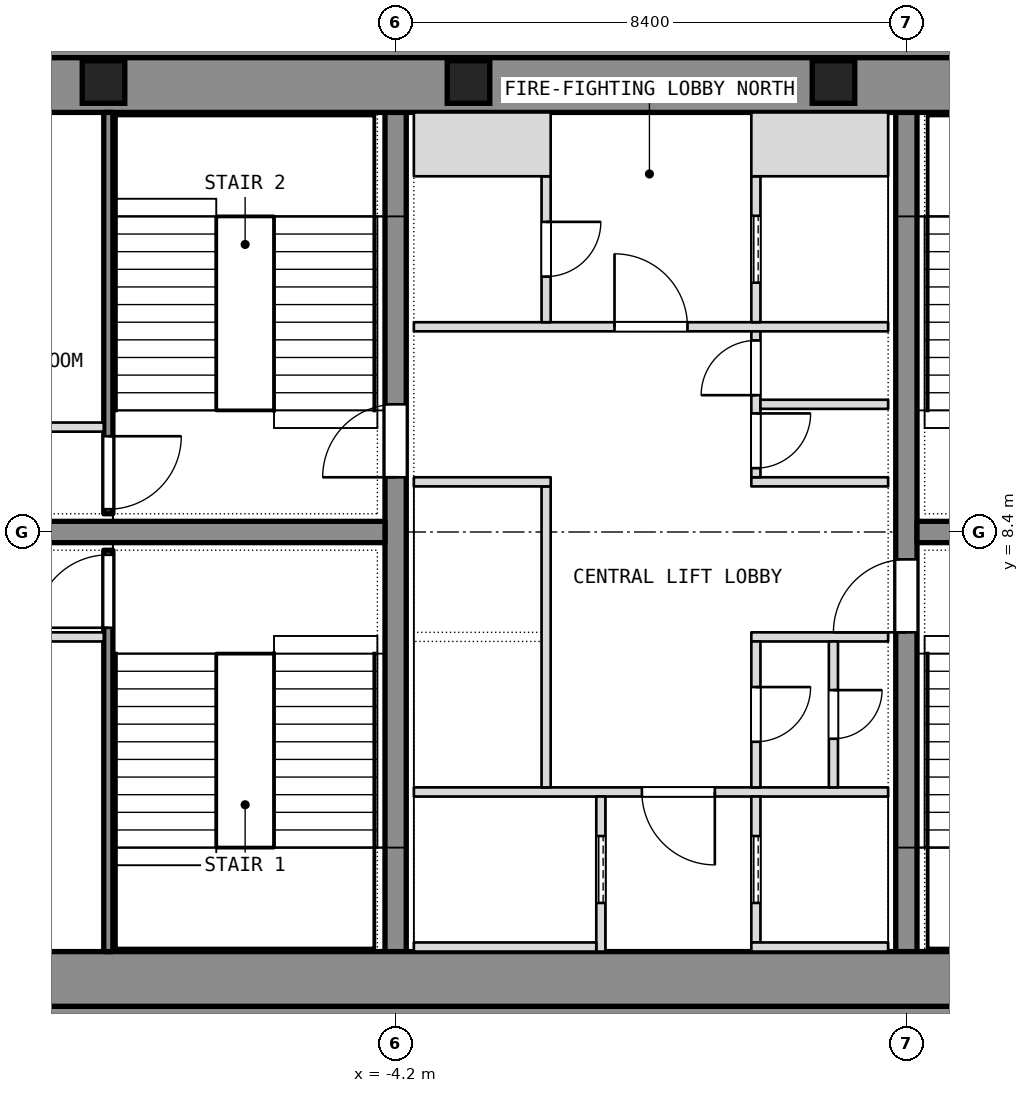
"""IFC4 building model, lengths in metres.
Left out: names, types, materials, properties, quantities, classifications, styles, units other than length and angle.
Written with IfcOpenShell. Run it as: python <this file> out.ifc"""

import sys

from ifc_helpers import new_model, si_unit, direction, frame, frame_2d, origin, origin_2d, place, context, subcontext, project, spatial, rectangle, extrude, element, fill, save


model = new_model("IFC4")
c1 = context("Model", 3, precision=1e-05, world=origin(), true_north=direction((0.0, 1.0)))
c2 = subcontext(c1, "Body", "Model", "MODEL_VIEW")
j1 = project(units=[si_unit("LENGTHUNIT", "METRE"), si_unit("PLANEANGLEUNIT", "RADIAN")], contexts=[c1])
p1 = place(None, origin())
s1 = spatial("IfcSite", under=j1, at=p1, CompositionType="ELEMENT")
p2 = place(p1, origin())
s2 = spatial("IfcBuilding", under=s1, at=p2, CompositionType="ELEMENT")
p3 = place(p2, frame((0.0, 0.0, 266.9)))
s3 = spatial("IfcBuildingStorey", under=s2, at=p3, CompositionType="ELEMENT", Elevation=266.9)
for number, where, z_axis, x_axis in (
    (1, (-11.1, 0.3, 0.0), (0.0, 0.0, 1.0), (1.0, 0.0, 0.0)),
    (2, (-11.1, 16.5, 0.0), (0.0, 0.0, 1.0), (1.0, 0.0, 0.0)),
):
    element("IfcWall", number, at=place(p3, frame(where, z_axis=z_axis, x_axis=x_axis)), inside=s3, PredefinedType="SHEAR", context=c2, shape_type="SweptSolid", body=[
        extrude(rectangle(XDim=22.2, YDim=0.6, at=frame_2d((11.1, 0.0))), origin(), (0.0, 0.0, 1.0), 3.6),
    ])
p4 = place(p3, frame((-4.2, 0.6, 0.0), z_axis=(0.0, 0.0, 1.0), x_axis=(0.0, 1.0, 0.0)))
e3 = element("IfcWall", 3, at=p4, inside=s3, PredefinedType="SHEAR", context=c2, shape_type="SweptSolid", body=[
    extrude(rectangle(XDim=15.6, YDim=0.35, at=frame_2d((7.8, 0.0))), origin(), (0.0, 0.0, 1.0), 3.6),
])
p5 = place(p4, frame((8.7, 0.0, 0.0)))
e4 = element("IfcOpeningElement", 4, at=p5, cuts=e3, PredefinedType="OPENING", context=c2, shape_type="SweptSolid", body=[
    extrude(rectangle(XDim=1.2, YDim=2.1, at=frame_2d((0.6, 1.05))), frame((0.0, 0.175, 0.0), z_axis=(0.0, -1.0, 0.0), x_axis=(1.0, 0.0, 0.0)), (0.0, 0.0, 1.0), 0.35),
])
p6 = place(p3, frame((4.2, 0.6, 0.0), z_axis=(0.0, 0.0, 1.0), x_axis=(0.0, 1.0, 0.0)))
e5 = element("IfcWall", 5, at=p6, inside=s3, PredefinedType="SHEAR", context=c2, shape_type="SweptSolid", body=[
    extrude(rectangle(XDim=15.6, YDim=0.35, at=frame_2d((7.8, 0.0))), origin(), (0.0, 0.0, 1.0), 3.6),
])
p7 = place(p6, frame((6.15, 0.0, 0.0)))
e6 = element("IfcOpeningElement", 6, at=p7, cuts=e5, PredefinedType="OPENING", context=c2, shape_type="SweptSolid", body=[
    extrude(rectangle(XDim=1.2, YDim=2.1, at=frame_2d((0.6, 1.05))), frame((0.0, 0.175, 0.0), z_axis=(0.0, -1.0, 0.0), x_axis=(1.0, 0.0, 0.0)), (0.0, 0.0, 1.0), 0.35),
])
for number, where, z_axis, x_axis in (
    (7, (-11.1, 8.4, 0.0), (0.0, 0.0, 1.0), (1.0, 0.0, 0.0)),
    (8, (4.375, 8.4, 0.0), (0.0, 0.0, 1.0), (1.0, 0.0, 0.0)),
):
    element("IfcWall", number, at=place(p3, frame(where, z_axis=z_axis, x_axis=x_axis)), inside=s3, PredefinedType="SHEAR", context=c2, shape_type="SweptSolid", body=[
        extrude(rectangle(XDim=6.725, YDim=0.35, at=frame_2d((3.363, 0.0))), origin(), (0.0, 0.0, 1.0), 3.6),
    ])
for number, where, z_axis, x_axis in (
    (9, (-9.004, 15.8, 0.0), (0.0, 0.0, 1.0), (1.0, 0.0, 0.0)),
    (10, (-3.001, 15.8, 0.0), (0.0, 0.0, 1.0), (1.0, 0.0, 0.0)),
    (11, (3.001, 15.8, 0.0), (0.0, 0.0, 1.0), (1.0, 0.0, 0.0)),
):
    element("IfcColumn", number, at=place(p3, frame(where, z_axis=z_axis, x_axis=x_axis)), inside=s3, PredefinedType="COLUMN", context=c2, shape_type="SweptSolid", body=[
        extrude(rectangle(XDim=0.7, YDim=0.7, at=origin_2d()), origin(), (0.0, 0.0, 1.0), 3.6),
    ])
for number, where, z_axis, x_axis in (
    (12, (-11.1, 1.05, 0.0), (0.0, 0.0, 1.0), (1.0, 0.0, 0.0)),
    (13, (-11.1, 15.75, 0.0), (0.0, 0.0, 1.0), (1.0, 0.0, 0.0)),
):
    element("IfcWall", number, at=place(p3, frame(where, z_axis=z_axis, x_axis=x_axis)), inside=s3, PredefinedType="PARTITIONING", context=c2, shape_type="SweptSolid", body=[
        extrude(rectangle(XDim=22.2, YDim=0.9, at=frame_2d((11.1, 0.0))), origin(), (0.0, 0.0, 1.0), 3.34),
    ])
p8 = place(p3, frame((-8.925, 1.5, 0.0), z_axis=(0.0, 0.0, 1.0), x_axis=(0.0, 1.0, 0.0)))
e14 = element("IfcWall", 14, at=p8, inside=s3, PredefinedType="SHEAR", context=c2, shape_type="SweptSolid", body=[
    extrude(rectangle(XDim=6.6, YDim=0.15, at=frame_2d((3.3, 0.0))), origin(), (0.0, 0.0, 1.0), 3.34),
])
p9 = place(p8, frame((5.325, 0.0, 0.0)))
e15 = element("IfcOpeningElement", 15, at=p9, cuts=e14, PredefinedType="OPENING", context=c2, shape_type="SweptSolid", body=[
    extrude(rectangle(XDim=1.2, YDim=2.1, at=frame_2d((0.6, 1.05))), frame((0.0, 0.075, 0.0), z_axis=(0.0, -1.0, 0.0), x_axis=(1.0, 0.0, 0.0)), (0.0, 0.0, 1.0), 0.15),
])
p10 = place(p3, frame((-11.1, 6.675, 0.0), z_axis=(0.0, 0.0, 1.0), x_axis=(1.0, 0.0, 0.0)))
e16 = element("IfcWall", 16, at=p10, inside=s3, PredefinedType="PARTITIONING", context=c2, shape_type="SweptSolid", body=[
    extrude(rectangle(XDim=2.1, YDim=0.15, at=frame_2d((1.05, 0.0))), origin(), (0.0, 0.0, 1.0), 3.34),
])
p11 = place(p3, frame((-8.925, 8.7, 0.0), z_axis=(0.0, 0.0, 1.0), x_axis=(0.0, 1.0, 0.0)))
e17 = element("IfcWall", 17, at=p11, inside=s3, PredefinedType="SHEAR", context=c2, shape_type="SweptSolid", body=[
    extrude(rectangle(XDim=6.6, YDim=0.15, at=frame_2d((3.3, 0.0))), origin(), (0.0, 0.0, 1.0), 3.34),
])
p12 = place(p11, frame((0.075, 0.0, 0.0)))
e18 = element("IfcOpeningElement", 18, at=p12, cuts=e17, PredefinedType="OPENING", context=c2, shape_type="SweptSolid", body=[
    extrude(rectangle(XDim=1.2, YDim=2.1, at=frame_2d((0.6, 1.05))), frame((0.0, 0.075, 0.0), z_axis=(0.0, -1.0, 0.0), x_axis=(1.0, 0.0, 0.0)), (0.0, 0.0, 1.0), 0.15),
])
p13 = place(p3, frame((-11.1, 10.125, 0.0), z_axis=(0.0, 0.0, 1.0), x_axis=(1.0, 0.0, 0.0)))
e19 = element("IfcWall", 19, at=p13, inside=s3, PredefinedType="PARTITIONING", context=c2, shape_type="SweptSolid", body=[
    extrude(rectangle(XDim=2.1, YDim=0.15, at=frame_2d((1.05, 0.0))), origin(), (0.0, 0.0, 1.0), 3.34),
])
p14 = place(p3, frame((-3.9, 4.125, 0.0), z_axis=(0.0, 0.0, 1.0), x_axis=(1.0, 0.0, 0.0)))
e20 = element("IfcWall", 20, at=p14, inside=s3, PredefinedType="PARTITIONING", context=c2, shape_type="SweptSolid", body=[
    extrude(rectangle(XDim=7.8, YDim=0.15, at=frame_2d((3.9, 0.0))), origin(), (0.0, 0.0, 1.0), 3.34),
])
p15 = place(p14, frame((3.75, 0.0, 0.0)))
e21 = element("IfcOpeningElement", 21, at=p15, cuts=e20, PredefinedType="OPENING", context=c2, shape_type="SweptSolid", body=[
    extrude(rectangle(XDim=1.2, YDim=2.1, at=frame_2d((0.6, 1.05))), frame((0.0, 0.075, 0.0), z_axis=(0.0, -1.0, 0.0), x_axis=(1.0, 0.0, 0.0)), (0.0, 0.0, 1.0), 0.15),
])
p16 = place(p3, frame((-3.9, 11.775, 0.0), z_axis=(0.0, 0.0, 1.0), x_axis=(1.0, 0.0, 0.0)))
e22 = element("IfcWall", 22, at=p16, inside=s3, PredefinedType="PARTITIONING", context=c2, shape_type="SweptSolid", body=[
    extrude(rectangle(XDim=7.8, YDim=0.15, at=frame_2d((3.9, 0.0))), origin(), (0.0, 0.0, 1.0), 3.34),
])
p17 = place(p16, frame((3.3, 0.0, 0.0)))
e23 = element("IfcOpeningElement", 23, at=p17, cuts=e22, PredefinedType="OPENING", context=c2, shape_type="SweptSolid", body=[
    extrude(rectangle(XDim=1.2, YDim=2.1, at=frame_2d((0.6, 1.05))), frame((0.0, 0.075, 0.0), z_axis=(0.0, -1.0, 0.0), x_axis=(1.0, 0.0, 0.0)), (0.0, 0.0, 1.0), 0.15),
])
p18 = place(p3, frame((-0.825, 1.5, 0.0), z_axis=(0.0, 0.0, 1.0), x_axis=(0.0, 1.0, 0.0)))
e24 = element("IfcWall", 24, at=p18, inside=s3, PredefinedType="SHEAR", context=c2, shape_type="SweptSolid", body=[
    extrude(rectangle(XDim=2.55, YDim=0.15, at=frame_2d((1.275, 0.0))), origin(), (0.0, 0.0, 1.0), 3.6),
])
p19 = place(p18, frame((0.8, 0.0, 0.0)))
e25 = element("IfcOpeningElement", 25, at=p19, cuts=e24, PredefinedType="OPENING", context=c2, shape_type="SweptSolid", body=[
    extrude(rectangle(XDim=1.1, YDim=2.1, at=frame_2d((0.55, 1.05))), frame((0.0, 0.075, 0.0), z_axis=(0.0, -1.0, 0.0), x_axis=(1.0, 0.0, 0.0)), (0.0, 0.0, 1.0), 0.15),
])
p20 = place(p3, frame((-3.9, 1.575, 0.0), z_axis=(0.0, 0.0, 1.0), x_axis=(1.0, 0.0, 0.0)))
e26 = element("IfcWall", 26, at=p20, inside=s3, PredefinedType="SHEAR", context=c2, shape_type="SweptSolid", body=[
    extrude(rectangle(XDim=3.0, YDim=0.15, at=frame_2d((1.5, 0.0))), origin(), (0.0, 0.0, 1.0), 3.6),
])
p21 = place(p3, frame((-1.725, 4.2, 0.0), z_axis=(0.0, 0.0, 1.0), x_axis=(0.0, 1.0, 0.0)))
e27 = element("IfcWall", 27, at=p21, inside=s3, PredefinedType="SHEAR", context=c2, shape_type="SweptSolid", body=[
    extrude(rectangle(XDim=4.95, YDim=0.15, at=frame_2d((2.475, 0.0))), origin(), (0.0, 0.0, 1.0), 3.6),
])
p22 = place(p3, frame((-3.9, 9.225, 0.0), z_axis=(0.0, 0.0, 1.0), x_axis=(1.0, 0.0, 0.0)))
e28 = element("IfcWall", 28, at=p22, inside=s3, PredefinedType="SHEAR", context=c2, shape_type="SweptSolid", body=[
    extrude(rectangle(XDim=2.25, YDim=0.15, at=frame_2d((1.125, 0.0))), origin(), (0.0, 0.0, 1.0), 3.6),
])
p23 = place(p3, frame((-1.725, 11.85, 0.0), z_axis=(0.0, 0.0, 1.0), x_axis=(0.0, 1.0, 0.0)))
e29 = element("IfcWall", 29, at=p23, inside=s3, PredefinedType="PARTITIONING", context=c2, shape_type="SweptSolid", body=[
    extrude(rectangle(XDim=2.4, YDim=0.15, at=frame_2d((1.2, 0.0))), origin(), (0.0, 0.0, 1.0), 3.34),
])
p24 = place(p23, frame((0.75, 0.0, 0.0)))
e30 = element("IfcOpeningElement", 30, at=p24, cuts=e29, PredefinedType="OPENING", context=c2, shape_type="SweptSolid", body=[
    extrude(rectangle(XDim=0.9, YDim=2.1, at=frame_2d((0.45, 1.05))), frame((0.0, 0.075, 0.0), z_axis=(0.0, -1.0, 0.0), x_axis=(1.0, 0.0, 0.0)), (0.0, 0.0, 1.0), 0.15),
])
p25 = place(p3, frame((-3.9, 14.775, 0.0), z_axis=(0.0, 0.0, 1.0), x_axis=(1.0, 0.0, 0.0)))
e31 = element("IfcWall", 31, at=p25, inside=s3, PredefinedType="PARTITIONING", context=c2, shape_type="SweptSolid", body=[
    extrude(rectangle(XDim=2.25, YDim=1.05, at=frame_2d((1.125, 0.0))), origin(), (0.0, 0.0, 1.0), 3.34),
])
p26 = place(p3, frame((1.725, 1.65, 0.0), z_axis=(0.0, 0.0, 1.0), x_axis=(0.0, 1.0, 0.0)))
e32 = element("IfcWall", 32, at=p26, inside=s3, PredefinedType="SHEAR", context=c2, shape_type="SweptSolid", body=[
    extrude(rectangle(XDim=2.4, YDim=0.15, at=frame_2d((1.2, 0.0))), origin(), (0.0, 0.0, 1.0), 3.6),
])
p27 = place(p26, frame((0.65, 0.0, 0.0)))
e33 = element("IfcOpeningElement", 33, at=p27, cuts=e32, PredefinedType="OPENING", context=c2, shape_type="SweptSolid", body=[
    extrude(rectangle(XDim=1.1, YDim=2.1, at=frame_2d((0.55, 1.05))), frame((0.0, 0.075, 0.0), z_axis=(0.0, -1.0, 0.0), x_axis=(1.0, 0.0, 0.0)), (0.0, 0.0, 1.0), 0.15),
])
p28 = place(p3, frame((1.65, 1.575, 0.0), z_axis=(0.0, 0.0, 1.0), x_axis=(1.0, 0.0, 0.0)))
e34 = element("IfcWall", 34, at=p28, inside=s3, PredefinedType="SHEAR", context=c2, shape_type="SweptSolid", body=[
    extrude(rectangle(XDim=2.25, YDim=0.15, at=frame_2d((1.125, 0.0))), origin(), (0.0, 0.0, 1.0), 3.6),
])
p29 = place(p3, frame((1.725, 11.85, 0.0), z_axis=(0.0, 0.0, 1.0), x_axis=(0.0, 1.0, 0.0)))
e35 = element("IfcWall", 35, at=p29, inside=s3, PredefinedType="SHEAR", context=c2, shape_type="SweptSolid", body=[
    extrude(rectangle(XDim=2.4, YDim=0.15, at=frame_2d((1.2, 0.0))), origin(), (0.0, 0.0, 1.0), 3.6),
])
p30 = place(p29, frame((0.65, 0.0, 0.0)))
e36 = element("IfcOpeningElement", 36, at=p30, cuts=e35, PredefinedType="OPENING", context=c2, shape_type="SweptSolid", body=[
    extrude(rectangle(XDim=1.1, YDim=2.1, at=frame_2d((0.55, 1.05))), frame((0.0, 0.075, 0.0), z_axis=(0.0, -1.0, 0.0), x_axis=(1.0, 0.0, 0.0)), (0.0, 0.0, 1.0), 0.15),
])
p31 = place(p3, frame((1.65, 14.775, 0.0), z_axis=(0.0, 0.0, 1.0), x_axis=(1.0, 0.0, 0.0)))
e37 = element("IfcWall", 37, at=p31, inside=s3, PredefinedType="SHEAR", context=c2, shape_type="SweptSolid", body=[
    extrude(rectangle(XDim=2.25, YDim=1.05, at=frame_2d((1.125, 0.0))), origin(), (0.0, 0.0, 1.0), 3.6),
])
for number, where, z_axis, x_axis in (
    (38, (1.65, 6.675, 0.0), (0.0, 0.0, 1.0), (1.0, 0.0, 0.0)),
    (39, (1.65, 9.225, 0.0), (0.0, 0.0, 1.0), (1.0, 0.0, 0.0)),
):
    element("IfcWall", number, at=place(p3, frame(where, z_axis=z_axis, x_axis=x_axis)), inside=s3, PredefinedType="PARTITIONING", context=c2, shape_type="SweptSolid", body=[
        extrude(rectangle(XDim=2.25, YDim=0.15, at=frame_2d((1.125, 0.0))), origin(), (0.0, 0.0, 1.0), 3.34),
    ])
p32 = place(p3, frame((1.725, 4.2, 0.0), z_axis=(0.0, 0.0, 1.0), x_axis=(0.0, 1.0, 0.0)))
e40 = element("IfcWall", 40, at=p32, inside=s3, PredefinedType="PARTITIONING", context=c2, shape_type="SweptSolid", body=[
    extrude(rectangle(XDim=2.4, YDim=0.15, at=frame_2d((1.2, 0.0))), origin(), (0.0, 0.0, 1.0), 3.34),
])
p33 = place(p32, frame((0.75, 0.0, 0.0)))
e41 = element("IfcOpeningElement", 41, at=p33, cuts=e40, PredefinedType="OPENING", context=c2, shape_type="SweptSolid", body=[
    extrude(rectangle(XDim=0.9, YDim=2.1, at=frame_2d((0.45, 1.05))), frame((0.0, 0.075, 0.0), z_axis=(0.0, -1.0, 0.0), x_axis=(1.0, 0.0, 0.0)), (0.0, 0.0, 1.0), 0.15),
])
p34 = place(p3, frame((1.725, 9.3, 0.0), z_axis=(0.0, 0.0, 1.0), x_axis=(0.0, 1.0, 0.0)))
e42 = element("IfcWall", 42, at=p34, inside=s3, PredefinedType="PARTITIONING", context=c2, shape_type="SweptSolid", body=[
    extrude(rectangle(XDim=2.4, YDim=0.15, at=frame_2d((1.2, 0.0))), origin(), (0.0, 0.0, 1.0), 3.34),
])
p35 = place(p34, frame((0.15, 0.0, 0.0)))
e43 = element("IfcOpeningElement", 43, at=p35, cuts=e42, PredefinedType="OPENING", context=c2, shape_type="SweptSolid", body=[
    extrude(rectangle(XDim=0.9, YDim=2.1, at=frame_2d((0.45, 1.05))), frame((0.0, 0.075, 0.0), z_axis=(0.0, -1.0, 0.0), x_axis=(1.0, 0.0, 0.0)), (0.0, 0.0, 1.0), 0.15),
])
p36 = place(p34, frame((1.35, 0.0, 0.0)))
e44 = element("IfcOpeningElement", 44, at=p36, cuts=e42, PredefinedType="OPENING", context=c2, shape_type="SweptSolid", body=[
    extrude(rectangle(XDim=0.9, YDim=2.1, at=frame_2d((0.45, 1.05))), frame((0.0, 0.075, 0.0), z_axis=(0.0, -1.0, 0.0), x_axis=(1.0, 0.0, 0.0)), (0.0, 0.0, 1.0), 0.15),
])
p37 = place(p3, frame((3.0, 4.2, 0.0), z_axis=(0.0, 0.0, 1.0), x_axis=(0.0, 1.0, 0.0)))
e45 = element("IfcWall", 45, at=p37, inside=s3, PredefinedType="PARTITIONING", context=c2, shape_type="SweptSolid", body=[
    extrude(rectangle(XDim=2.4, YDim=0.15, at=frame_2d((1.2, 0.0))), origin(), (0.0, 0.0, 1.0), 3.34),
])
p38 = place(p37, frame((0.8, 0.0, 0.0)))
e46 = element("IfcOpeningElement", 46, at=p38, cuts=e45, PredefinedType="OPENING", context=c2, shape_type="SweptSolid", body=[
    extrude(rectangle(XDim=0.8, YDim=2.1, at=frame_2d((0.4, 1.05))), frame((0.0, 0.075, 0.0), z_axis=(0.0, -1.0, 0.0), x_axis=(1.0, 0.0, 0.0)), (0.0, 0.0, 1.0), 0.15),
])
p39 = place(p3, frame((1.8, 10.5, 0.0), z_axis=(0.0, 0.0, 1.0), x_axis=(1.0, 0.0, 0.0)))
e47 = element("IfcWall", 47, at=p39, inside=s3, PredefinedType="PARTITIONING", context=c2, shape_type="SweptSolid", body=[
    extrude(rectangle(XDim=2.1, YDim=0.15, at=frame_2d((1.05, 0.0))), origin(), (0.0, 0.0, 1.0), 3.34),
])
p40 = place(p9, origin())
e48 = element("IfcDoor", 48, at=p40, inside=s3, OperationType="SINGLE_SWING_LEFT", PredefinedType="DOOR", context=c2, shape_type="SweptSolid", body=[
    extrude(rectangle(XDim=1.2, YDim=2.1, at=frame_2d((0.6, 1.05))), frame((0.0, 0.025, 0.0), z_axis=(0.0, -1.0, 0.0), x_axis=(1.0, 0.0, 0.0)), (0.0, 0.0, 1.0), 0.05),
])
fill(e15, e48)
p41 = place(p12, origin())
e49 = element("IfcDoor", 49, at=p41, inside=s3, OperationType="SINGLE_SWING_LEFT", PredefinedType="DOOR", context=c2, shape_type="SweptSolid", body=[
    extrude(rectangle(XDim=1.2, YDim=2.1, at=frame_2d((0.6, 1.05))), frame((0.0, 0.025, 0.0), z_axis=(0.0, -1.0, 0.0), x_axis=(1.0, 0.0, 0.0)), (0.0, 0.0, 1.0), 0.05),
])
fill(e18, e49)
p42 = place(p33, origin())
e50 = element("IfcDoor", 50, at=p42, inside=s3, OperationType="SINGLE_SWING_LEFT", PredefinedType="DOOR", context=c2, shape_type="SweptSolid", body=[
    extrude(rectangle(XDim=0.9, YDim=2.1, at=frame_2d((0.45, 1.05))), frame((0.0, 0.025, 0.0), z_axis=(0.0, -1.0, 0.0), x_axis=(1.0, 0.0, 0.0)), (0.0, 0.0, 1.0), 0.05),
])
fill(e41, e50)
p43 = place(p38, origin())
e51 = element("IfcDoor", 51, at=p43, inside=s3, OperationType="SINGLE_SWING_LEFT", PredefinedType="DOOR", context=c2, shape_type="SweptSolid", body=[
    extrude(rectangle(XDim=0.8, YDim=2.1, at=frame_2d((0.4, 1.05))), frame((0.0, 0.025, 0.0), z_axis=(0.0, -1.0, 0.0), x_axis=(1.0, 0.0, 0.0)), (0.0, 0.0, 1.0), 0.05),
])
fill(e46, e51)
p44 = place(p35, origin())
e52 = element("IfcDoor", 52, at=p44, inside=s3, OperationType="SINGLE_SWING_LEFT", PredefinedType="DOOR", context=c2, shape_type="SweptSolid", body=[
    extrude(rectangle(XDim=0.9, YDim=2.1, at=frame_2d((0.45, 1.05))), frame((0.0, 0.025, 0.0), z_axis=(0.0, -1.0, 0.0), x_axis=(1.0, 0.0, 0.0)), (0.0, 0.0, 1.0), 0.05),
])
fill(e43, e52)
p45 = place(p36, origin())
e53 = element("IfcDoor", 53, at=p45, inside=s3, OperationType="SINGLE_SWING_LEFT", PredefinedType="DOOR", context=c2, shape_type="SweptSolid", body=[
    extrude(rectangle(XDim=0.9, YDim=2.1, at=frame_2d((0.45, 1.05))), frame((0.0, 0.025, 0.0), z_axis=(0.0, -1.0, 0.0), x_axis=(1.0, 0.0, 0.0)), (0.0, 0.0, 1.0), 0.05),
])
fill(e44, e53)
p46 = place(p19, origin())
e54 = element("IfcDoor", 54, at=p46, inside=s3, OperationType="SLIDING_TO_LEFT", PredefinedType="DOOR", context=c2, shape_type="SweptSolid", body=[
    extrude(rectangle(XDim=1.1, YDim=2.1, at=frame_2d((0.55, 1.05))), frame((0.0, 0.025, 0.0), z_axis=(0.0, -1.0, 0.0), x_axis=(1.0, 0.0, 0.0)), (0.0, 0.0, 1.0), 0.05),
])
fill(e25, e54)
p47 = place(p27, origin())
e55 = element("IfcDoor", 55, at=p47, inside=s3, OperationType="SLIDING_TO_LEFT", PredefinedType="DOOR", context=c2, shape_type="SweptSolid", body=[
    extrude(rectangle(XDim=1.1, YDim=2.1, at=frame_2d((0.55, 1.05))), frame((0.0, 0.025, 0.0), z_axis=(0.0, -1.0, 0.0), x_axis=(1.0, 0.0, 0.0)), (0.0, 0.0, 1.0), 0.05),
])
fill(e33, e55)
p48 = place(p30, origin())
e56 = element("IfcDoor", 56, at=p48, inside=s3, OperationType="SLIDING_TO_LEFT", PredefinedType="DOOR", context=c2, shape_type="SweptSolid", body=[
    extrude(rectangle(XDim=1.1, YDim=2.1, at=frame_2d((0.55, 1.05))), frame((0.0, 0.025, 0.0), z_axis=(0.0, -1.0, 0.0), x_axis=(1.0, 0.0, 0.0)), (0.0, 0.0, 1.0), 0.05),
])
fill(e36, e56)
p49 = place(p15, origin())
e57 = element("IfcDoor", 57, at=p49, inside=s3, OperationType="SINGLE_SWING_LEFT", PredefinedType="DOOR", context=c2, shape_type="SweptSolid", body=[
    extrude(rectangle(XDim=1.2, YDim=2.1, at=frame_2d((0.6, 1.05))), frame((0.0, 0.025, 0.0), z_axis=(0.0, -1.0, 0.0), x_axis=(1.0, 0.0, 0.0)), (0.0, 0.0, 1.0), 0.05),
])
fill(e21, e57)
p50 = place(p17, origin())
e58 = element("IfcDoor", 58, at=p50, inside=s3, OperationType="SINGLE_SWING_LEFT", PredefinedType="DOOR", context=c2, shape_type="SweptSolid", body=[
    extrude(rectangle(XDim=1.2, YDim=2.1, at=frame_2d((0.6, 1.05))), frame((0.0, 0.025, 0.0), z_axis=(0.0, -1.0, 0.0), x_axis=(1.0, 0.0, 0.0)), (0.0, 0.0, 1.0), 0.05),
])
fill(e23, e58)
p51 = place(p24, origin())
e59 = element("IfcDoor", 59, at=p51, inside=s3, OperationType="SINGLE_SWING_LEFT", PredefinedType="DOOR", context=c2, shape_type="SweptSolid", body=[
    extrude(rectangle(XDim=0.9, YDim=2.1, at=frame_2d((0.45, 1.05))), frame((0.0, 0.025, 0.0), z_axis=(0.0, -1.0, 0.0), x_axis=(1.0, 0.0, 0.0)), (0.0, 0.0, 1.0), 0.05),
])
fill(e30, e59)
p52 = place(p5, origin())
e60 = element("IfcDoor", 60, at=p52, inside=s3, OperationType="SINGLE_SWING_LEFT", PredefinedType="DOOR", context=c2, shape_type="SweptSolid", body=[
    extrude(rectangle(XDim=1.2, YDim=2.1, at=frame_2d((0.6, 1.05))), frame((0.0, 0.025, 0.0), z_axis=(0.0, -1.0, 0.0), x_axis=(1.0, 0.0, 0.0)), (0.0, 0.0, 1.0), 0.05),
])
fill(e4, e60)
p53 = place(p7, origin())
e61 = element("IfcDoor", 61, at=p53, inside=s3, OperationType="SINGLE_SWING_LEFT", PredefinedType="DOOR", context=c2, shape_type="SweptSolid", body=[
    extrude(rectangle(XDim=1.2, YDim=2.1, at=frame_2d((0.6, 1.05))), frame((0.0, 0.025, 0.0), z_axis=(0.0, -1.0, 0.0), x_axis=(1.0, 0.0, 0.0)), (0.0, 0.0, 1.0), 0.05),
])
fill(e6, e61)
save(model, sys.argv[1])
